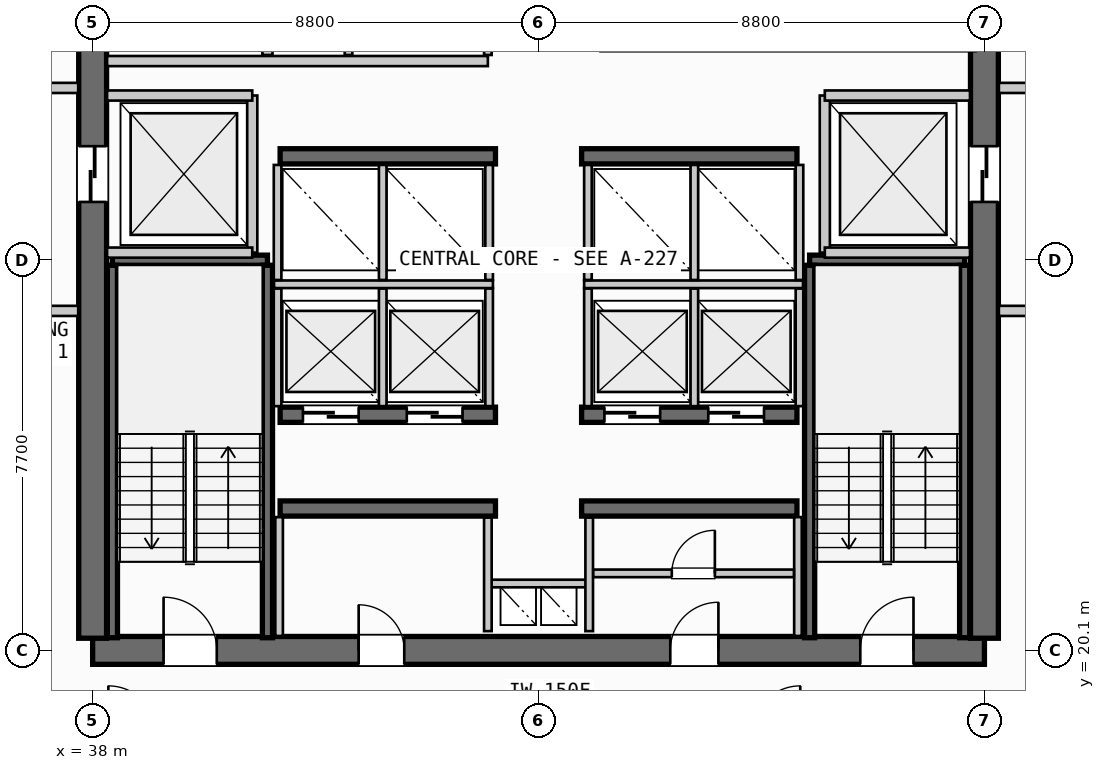
"""IFC4 building model, lengths in metres.
Left out: names, types, materials, properties, quantities, classifications, styles, units other than length and angle.
Written with IfcOpenShell. Run it as: python <this file> out.ifc"""

import sys

from ifc_helpers import new_model, si_unit, direction, frame, frame_2d, origin, place, context, subcontext, project, spatial, rectangle, extrude, source, transform, mapped, element, fill, save


model = new_model("IFC4")
c1 = context("Model", 3, precision=1e-05, world=origin(), true_north=direction((0.0, 1.0)))
c2 = subcontext(c1, "Body", "Model", "MODEL_VIEW")
j1 = project(units=[si_unit("LENGTHUNIT", "METRE"), si_unit("PLANEANGLEUNIT", "RADIAN")], contexts=[c1])
p1 = place(None, origin())
s1 = spatial("IfcSite", under=j1, at=p1, CompositionType="ELEMENT")
p2 = place(p1, origin())
s2 = spatial("IfcBuilding", under=s1, at=p2, CompositionType="ELEMENT")
p3 = place(p2, frame((0.0, 0.0, 193.9)))
s3 = spatial("IfcBuildingStorey", under=s2, at=p3, CompositionType="ELEMENT", Elevation=193.9)
p4 = place(p3, frame((38.0, 20.1, 0.0), z_axis=(0.0, 0.0, 1.0), x_axis=(1.0, 0.0, 0.0)))
e1 = element("IfcWall", 1, at=p4, inside=s3, PredefinedType="SHEAR", context=c2, shape_type="SweptSolid", body=[
    extrude(rectangle(XDim=17.6, YDim=0.55, at=frame_2d((8.8, 0.0))), origin(), (0.0, 0.0, 1.0), 3.26),
])
p5 = place(p4, frame((1.4, 0.0, 0.0)))
e2 = element("IfcOpeningElement", 2, at=p5, cuts=e1, PredefinedType="OPENING", context=c2, shape_type="SweptSolid", body=[
    extrude(rectangle(XDim=1.05, YDim=2.15, at=frame_2d((0.525, 1.075))), frame((0.0, 0.285, 0.0), z_axis=(0.0, -1.0, 0.0), x_axis=(1.0, 0.0, 0.0)), (0.0, 0.0, 1.0), 0.57),
])
p6 = place(p4, frame((15.15, 0.0, 0.0)))
e3 = element("IfcOpeningElement", 3, at=p6, cuts=e1, PredefinedType="OPENING", context=c2, shape_type="SweptSolid", body=[
    extrude(rectangle(XDim=1.05, YDim=2.15, at=frame_2d((0.525, 1.075))), frame((0.0, 0.285, 0.0), z_axis=(0.0, -1.0, 0.0), x_axis=(1.0, 0.0, 0.0)), (0.0, 0.0, 1.0), 0.57),
])
p7 = place(p4, frame((5.25, 0.0, 0.0)))
e4 = element("IfcOpeningElement", 4, at=p7, cuts=e1, PredefinedType="OPENING", context=c2, shape_type="SweptSolid", body=[
    extrude(rectangle(XDim=0.9, YDim=2.15, at=frame_2d((0.45, 1.075))), frame((0.0, 0.285, 0.0), z_axis=(0.0, -1.0, 0.0), x_axis=(1.0, 0.0, 0.0)), (0.0, 0.0, 1.0), 0.57),
])
p8 = place(p4, frame((11.4, 0.0, 0.0)))
e5 = element("IfcOpeningElement", 5, at=p8, cuts=e1, PredefinedType="OPENING", context=c2, shape_type="SweptSolid", body=[
    extrude(rectangle(XDim=0.95, YDim=2.15, at=frame_2d((0.475, 1.075))), frame((0.0, 0.285, 0.0), z_axis=(0.0, -1.0, 0.0), x_axis=(1.0, 0.0, 0.0)), (0.0, 0.0, 1.0), 0.57),
])
p9 = place(p3, frame((38.0, 35.26, 0.0), z_axis=(0.0, 0.0, 1.0), x_axis=(0.0, -1.0, 0.0)))
e6 = element("IfcWall", 6, at=p9, inside=s3, PredefinedType="SHEAR", context=c2, shape_type="SweptSolid", body=[
    extrude(rectangle(XDim=14.92, YDim=0.55, at=frame_2d((7.46, 0.0))), origin(), (0.0, 0.0, 1.0), 3.26),
])
p10 = place(p9, frame((5.21, 0.0, 0.0)))
e7 = element("IfcOpeningElement", 7, at=p10, cuts=e6, PredefinedType="OPENING", context=c2, shape_type="SweptSolid", body=[
    extrude(rectangle(XDim=1.1, YDim=2.2, at=frame_2d((0.55, 1.1))), frame((0.0, 0.285, 0.0), z_axis=(0.0, -1.0, 0.0), x_axis=(1.0, 0.0, 0.0)), (0.0, 0.0, 1.0), 0.57),
])
p11 = place(p3, frame((55.6, 20.34, 0.0), z_axis=(0.0, 0.0, 1.0), x_axis=(0.0, 1.0, 0.0)))
e8 = element("IfcWall", 8, at=p11, inside=s3, PredefinedType="SHEAR", context=c2, shape_type="SweptSolid", body=[
    extrude(rectangle(XDim=14.92, YDim=0.55, at=frame_2d((7.46, 0.0))), origin(), (0.0, 0.0, 1.0), 3.26),
])
p12 = place(p11, frame((12.71, 0.0, 0.0)))
e9 = element("IfcOpeningElement", 9, at=p12, cuts=e8, PredefinedType="OPENING", context=c2, shape_type="SweptSolid", body=[
    extrude(rectangle(XDim=1.05, YDim=2.15, at=frame_2d((0.525, 1.075))), frame((0.0, 0.285, 0.0), z_axis=(0.0, -1.0, 0.0), x_axis=(1.0, 0.0, 0.0)), (0.0, 0.0, 1.0), 0.57),
])
p13 = place(p11, frame((8.61, 0.0, 0.0)))
e10 = element("IfcOpeningElement", 10, at=p13, cuts=e8, PredefinedType="OPENING", context=c2, shape_type="SweptSolid", body=[
    extrude(rectangle(XDim=1.1, YDim=2.2, at=frame_2d((0.55, 1.1))), frame((0.0, 0.285, 0.0), z_axis=(0.0, -1.0, 0.0), x_axis=(1.0, 0.0, 0.0)), (0.0, 0.0, 1.0), 0.57),
])
for number, where, z_axis, x_axis in (
    (11, (41.7, 22.9, 0.0), (0.0, 0.0, 1.0), (1.0, 0.0, 0.0)),
    (12, (47.65, 22.9, 0.0), (0.0, 0.0, 1.0), (1.0, 0.0, 0.0)),
):
    element("IfcWall", number, at=place(p3, frame(where, z_axis=z_axis, x_axis=x_axis)), inside=s3, PredefinedType="SHEAR", context=c2, shape_type="SweptSolid", body=[
        extrude(rectangle(XDim=4.25, YDim=0.3, at=frame_2d((2.125, 0.0))), origin(), (0.0, 0.0, 1.0), 3.26),
    ])
p14 = place(p3, frame((41.7, 24.75, 0.0), z_axis=(0.0, 0.0, 1.0), x_axis=(1.0, 0.0, 0.0)))
e13 = element("IfcWall", 13, at=p14, inside=s3, PredefinedType="SHEAR", context=c2, shape_type="SweptSolid", body=[
    extrude(rectangle(XDim=4.25, YDim=0.3, at=frame_2d((2.125, 0.0))), origin(), (0.0, 0.0, 1.0), 3.26),
])
p15 = place(p14, frame((0.45, 0.0, 0.0)))
e14 = element("IfcOpeningElement", 14, at=p15, cuts=e13, PredefinedType="OPENING", context=c2, shape_type="SweptSolid", body=[
    extrude(rectangle(XDim=1.1, YDim=2.2, at=frame_2d((0.55, 1.1))), frame((0.0, 0.16, 0.0), z_axis=(0.0, -1.0, 0.0), x_axis=(1.0, 0.0, 0.0)), (0.0, 0.0, 1.0), 0.32),
])
p16 = place(p14, frame((2.5, 0.0, 0.0)))
e15 = element("IfcOpeningElement", 15, at=p16, cuts=e13, PredefinedType="OPENING", context=c2, shape_type="SweptSolid", body=[
    extrude(rectangle(XDim=1.1, YDim=2.2, at=frame_2d((0.55, 1.1))), frame((0.0, 0.16, 0.0), z_axis=(0.0, -1.0, 0.0), x_axis=(1.0, 0.0, 0.0)), (0.0, 0.0, 1.0), 0.32),
])
p17 = place(p3, frame((47.65, 24.75, 0.0), z_axis=(0.0, 0.0, 1.0), x_axis=(1.0, 0.0, 0.0)))
e16 = element("IfcWall", 16, at=p17, inside=s3, PredefinedType="SHEAR", context=c2, shape_type="SweptSolid", body=[
    extrude(rectangle(XDim=4.25, YDim=0.3, at=frame_2d((2.125, 0.0))), origin(), (0.0, 0.0, 1.0), 3.26),
])
p18 = place(p17, frame((0.45, 0.0, 0.0)))
e17 = element("IfcOpeningElement", 17, at=p18, cuts=e16, PredefinedType="OPENING", context=c2, shape_type="SweptSolid", body=[
    extrude(rectangle(XDim=1.1, YDim=2.2, at=frame_2d((0.55, 1.1))), frame((0.0, 0.16, 0.0), z_axis=(0.0, -1.0, 0.0), x_axis=(1.0, 0.0, 0.0)), (0.0, 0.0, 1.0), 0.32),
])
p19 = place(p17, frame((2.5, 0.0, 0.0)))
e18 = element("IfcOpeningElement", 18, at=p19, cuts=e16, PredefinedType="OPENING", context=c2, shape_type="SweptSolid", body=[
    extrude(rectangle(XDim=1.1, YDim=2.2, at=frame_2d((0.55, 1.1))), frame((0.0, 0.16, 0.0), z_axis=(0.0, -1.0, 0.0), x_axis=(1.0, 0.0, 0.0)), (0.0, 0.0, 1.0), 0.32),
])
for number, where, z_axis, x_axis in (
    (19, (41.7, 29.85, 0.0), (0.0, 0.0, 1.0), (1.0, 0.0, 0.0)),
    (20, (47.65, 29.85, 0.0), (0.0, 0.0, 1.0), (1.0, 0.0, 0.0)),
):
    element("IfcWall", number, at=place(p3, frame(where, z_axis=z_axis, x_axis=x_axis)), inside=s3, PredefinedType="SHEAR", context=c2, shape_type="SweptSolid", body=[
        extrude(rectangle(XDim=4.25, YDim=0.3, at=frame_2d((2.125, 0.0))), origin(), (0.0, 0.0, 1.0), 3.26),
    ])
p20 = place(p3, frame((38.39, 27.8, 0.0), z_axis=(0.0, 0.0, 1.0), x_axis=(1.0, 0.0, 0.0)))
e21 = element("IfcWall", 21, at=p20, inside=s3, PredefinedType="SHEAR", context=c2, shape_type="SweptSolid", body=[
    extrude(rectangle(XDim=3.06, YDim=0.2, at=frame_2d((1.53, 0.0))), origin(), (0.0, 0.0, 1.0), 3.26),
])
for number, where, z_axis, x_axis in (
    (22, (41.45, 27.7, 0.0), (0.0, 0.0, 1.0), (0.0, -1.0, 0.0)),
    (23, (38.39, 20.35, 0.0), (0.0, 0.0, 1.0), (0.0, 1.0, 0.0)),
):
    element("IfcWall", number, at=place(p3, frame(where, z_axis=z_axis, x_axis=x_axis)), inside=s3, PredefinedType="SHEAR", context=c2, shape_type="SweptSolid", body=[
        extrude(rectangle(XDim=7.35, YDim=0.2, at=frame_2d((3.675, 0.0))), origin(), (0.0, 0.0, 1.0), 3.26),
    ])
p21 = place(p3, frame((52.15, 27.8, 0.0), z_axis=(0.0, 0.0, 1.0), x_axis=(1.0, 0.0, 0.0)))
e24 = element("IfcWall", 24, at=p21, inside=s3, PredefinedType="SHEAR", context=c2, shape_type="SweptSolid", body=[
    extrude(rectangle(XDim=3.06, YDim=0.2, at=frame_2d((1.53, 0.0))), origin(), (0.0, 0.0, 1.0), 3.26),
])
for number, where, z_axis, x_axis in (
    (25, (55.21, 27.7, 0.0), (0.0, 0.0, 1.0), (0.0, -1.0, 0.0)),
    (26, (52.15, 20.35, 0.0), (0.0, 0.0, 1.0), (0.0, 1.0, 0.0)),
):
    element("IfcWall", number, at=place(p3, frame(where, z_axis=z_axis, x_axis=x_axis)), inside=s3, PredefinedType="SHEAR", context=c2, shape_type="SweptSolid", body=[
        extrude(rectangle(XDim=7.35, YDim=0.2, at=frame_2d((3.675, 0.0))), origin(), (0.0, 0.0, 1.0), 3.26),
    ])
p22 = place(p3, frame((45.8, 21.42, 0.0), z_axis=(0.0, 0.0, 1.0), x_axis=(1.0, 0.0, 0.0)))
e27 = element("IfcWall", 27, at=p22, inside=s3, PredefinedType="PARTITIONING", context=c2, shape_type="SweptSolid", body=[
    extrude(rectangle(XDim=2.0, YDim=0.15, at=frame_2d((1.0, 0.0))), origin(), (0.0, 0.0, 1.0), 2.735),
])
for number, where, z_axis, x_axis in (
    (28, (45.8, 20.48, 0.0), (0.0, 0.0, 1.0), (0.0, 1.0, 0.0)),
    (29, (47.8, 20.48, 0.0), (0.0, 0.0, 1.0), (0.0, 1.0, 0.0)),
):
    element("IfcWall", number, at=place(p3, frame(where, z_axis=z_axis, x_axis=x_axis)), inside=s3, PredefinedType="PARTITIONING", context=c2, shape_type="SweptSolid", body=[
        extrude(rectangle(XDim=2.24, YDim=0.15, at=frame_2d((1.12, 0.0))), origin(), (0.0, 0.0, 1.0), 2.735),
    ])
p23 = place(p3, frame((41.15, 27.95, 0.0), z_axis=(0.0, 0.0, 1.0), x_axis=(0.0, 1.0, 0.0)))
e30 = element("IfcWall", 30, at=p23, inside=s3, PredefinedType="PARTITIONING", context=c2, shape_type="SweptSolid", body=[
    extrude(rectangle(XDim=3.1, YDim=0.2, at=frame_2d((1.55, 0.0))), origin(), (0.0, 0.0, 1.0), 2.735),
])
for number, where, z_axis, x_axis in (
    (31, (38.285, 27.95, 0.0), (0.0, 0.0, 1.0), (1.0, 0.0, 0.0)),
    (32, (38.285, 31.05, 0.0), (0.0, 0.0, 1.0), (1.0, 0.0, 0.0)),
):
    element("IfcWall", number, at=place(p3, frame(where, z_axis=z_axis, x_axis=x_axis)), inside=s3, PredefinedType="PARTITIONING", context=c2, shape_type="SweptSolid", body=[
        extrude(rectangle(XDim=2.865, YDim=0.2, at=frame_2d((1.433, 0.0))), origin(), (0.0, 0.0, 1.0), 2.735),
    ])
for number, where, z_axis, x_axis in (
    (33, (34.5, 26.8, 0.0), (0.0, 0.0, 1.0), (1.0, 0.0, 0.0)),
    (34, (34.5, 31.2, 0.0), (0.0, 0.0, 1.0), (1.0, 0.0, 0.0)),
):
    element("IfcWall", number, at=place(p3, frame(where, z_axis=z_axis, x_axis=x_axis)), inside=s3, PredefinedType="PARTITIONING", context=c2, shape_type="SweptSolid", body=[
        extrude(rectangle(XDim=3.215, YDim=0.2, at=frame_2d((1.607, 0.0))), origin(), (0.0, 0.0, 1.0), 2.735),
    ])
p24 = place(p3, frame((52.45, 27.95, 0.0), z_axis=(0.0, 0.0, 1.0), x_axis=(0.0, 1.0, 0.0)))
e35 = element("IfcWall", 35, at=p24, inside=s3, PredefinedType="PARTITIONING", context=c2, shape_type="SweptSolid", body=[
    extrude(rectangle(XDim=3.1, YDim=0.2, at=frame_2d((1.55, 0.0))), origin(), (0.0, 0.0, 1.0), 2.735),
])
for number, where, z_axis, x_axis in (
    (36, (52.45, 27.95, 0.0), (0.0, 0.0, 1.0), (1.0, 0.0, 0.0)),
    (37, (52.45, 31.05, 0.0), (0.0, 0.0, 1.0), (1.0, 0.0, 0.0)),
):
    element("IfcWall", number, at=place(p3, frame(where, z_axis=z_axis, x_axis=x_axis)), inside=s3, PredefinedType="PARTITIONING", context=c2, shape_type="SweptSolid", body=[
        extrude(rectangle(XDim=2.865, YDim=0.2, at=frame_2d((1.433, 0.0))), origin(), (0.0, 0.0, 1.0), 2.735),
    ])
for number, where, z_axis, x_axis in (
    (38, (55.885, 26.8, 0.0), (0.0, 0.0, 1.0), (1.0, 0.0, 0.0)),
    (39, (55.885, 31.2, 0.0), (0.0, 0.0, 1.0), (1.0, 0.0, 0.0)),
):
    element("IfcWall", number, at=place(p3, frame(where, z_axis=z_axis, x_axis=x_axis)), inside=s3, PredefinedType="PARTITIONING", context=c2, shape_type="SweptSolid", body=[
        extrude(rectangle(XDim=3.215, YDim=0.2, at=frame_2d((1.607, 0.0))), origin(), (0.0, 0.0, 1.0), 2.735),
    ])
for number, where, z_axis, x_axis in (
    (40, (41.68, 20.385, 0.0), (0.0, 0.0, 1.0), (0.0, 1.0, 0.0)),
    (41, (51.92, 20.385, 0.0), (0.0, 0.0, 1.0), (0.0, 1.0, 0.0)),
):
    element("IfcWall", number, at=place(p3, frame(where, z_axis=z_axis, x_axis=x_axis)), inside=s3, PredefinedType="PARTITIONING", context=c2, shape_type="SweptSolid", body=[
        extrude(rectangle(XDim=2.345, YDim=0.15, at=frame_2d((1.172, 0.0))), origin(), (0.0, 0.0, 1.0), 2.735),
    ])
p25 = place(p3, frame((47.88, 21.62, 0.0), z_axis=(0.0, 0.0, 1.0), x_axis=(1.0, 0.0, 0.0)))
e42 = element("IfcWall", 42, at=p25, inside=s3, PredefinedType="PARTITIONING", context=c2, shape_type="SweptSolid", body=[
    extrude(rectangle(XDim=3.96, YDim=0.15, at=frame_2d((1.98, 0.0))), origin(), (0.0, 0.0, 1.0), 2.735),
])
p26 = place(p25, frame((1.55, 0.0, 0.0)))
e43 = element("IfcOpeningElement", 43, at=p26, cuts=e42, PredefinedType="OPENING", context=c2, shape_type="SweptSolid", body=[
    extrude(rectangle(XDim=0.85, YDim=2.15, at=frame_2d((0.425, 1.075))), frame((0.0, 0.085, 0.0), z_axis=(0.0, -1.0, 0.0), x_axis=(1.0, 0.0, 0.0)), (0.0, 0.0, 1.0), 0.17),
])
p27 = place(p3, frame((41.58, 27.325, 0.0), z_axis=(0.0, 0.0, 1.0), x_axis=(1.0, 0.0, 0.0)))
e44 = element("IfcWall", 44, at=p27, inside=s3, PredefinedType="PARTITIONING", context=c2, shape_type="SweptSolid", body=[
    extrude(rectangle(XDim=4.32, YDim=0.15, at=frame_2d((2.16, 0.0))), origin(), (0.0, 0.0, 1.0), 2.735),
])
p28 = place(p3, frame((47.7, 27.325, 0.0), z_axis=(0.0, 0.0, 1.0), x_axis=(1.0, 0.0, 0.0)))
e45 = element("IfcWall", 45, at=p28, inside=s3, PredefinedType="PARTITIONING", context=c2, shape_type="SweptSolid", body=[
    extrude(rectangle(XDim=4.32, YDim=0.15, at=frame_2d((2.16, 0.0))), origin(), (0.0, 0.0, 1.0), 2.735),
])
for number, where, z_axis, x_axis in (
    (46, (41.65, 24.92, 0.0), (0.0, 0.0, 1.0), (0.0, 1.0, 0.0)),
    (47, (43.725, 24.92, 0.0), (0.0, 0.0, 1.0), (0.0, 1.0, 0.0)),
    (48, (45.825, 24.92, 0.0), (0.0, 0.0, 1.0), (0.0, 1.0, 0.0)),
    (49, (47.775, 24.92, 0.0), (0.0, 0.0, 1.0), (0.0, 1.0, 0.0)),
    (50, (49.875, 24.92, 0.0), (0.0, 0.0, 1.0), (0.0, 1.0, 0.0)),
    (51, (51.95, 24.92, 0.0), (0.0, 0.0, 1.0), (0.0, 1.0, 0.0)),
):
    element("IfcWall", number, at=place(p3, frame(where, z_axis=z_axis, x_axis=x_axis)), inside=s3, PredefinedType="PARTITIONING", context=c2, shape_type="SweptSolid", body=[
        extrude(rectangle(XDim=2.32, YDim=0.15, at=frame_2d((1.16, 0.0))), origin(), (0.0, 0.0, 1.0), 2.735),
    ])
for number, where, z_axis, x_axis in (
    (52, (41.65, 27.41, 0.0), (0.0, 0.0, 1.0), (0.0, 1.0, 0.0)),
    (53, (43.725, 27.41, 0.0), (0.0, 0.0, 1.0), (0.0, 1.0, 0.0)),
    (54, (45.825, 27.41, 0.0), (0.0, 0.0, 1.0), (0.0, 1.0, 0.0)),
    (55, (47.775, 27.41, 0.0), (0.0, 0.0, 1.0), (0.0, 1.0, 0.0)),
    (56, (49.875, 27.41, 0.0), (0.0, 0.0, 1.0), (0.0, 1.0, 0.0)),
    (57, (51.95, 27.41, 0.0), (0.0, 0.0, 1.0), (0.0, 1.0, 0.0)),
):
    element("IfcWall", number, at=place(p3, frame(where, z_axis=z_axis, x_axis=x_axis)), inside=s3, PredefinedType="PARTITIONING", context=c2, shape_type="SweptSolid", body=[
        extrude(rectangle(XDim=2.27, YDim=0.15, at=frame_2d((1.135, 0.0))), origin(), (0.0, 0.0, 1.0), 2.735),
    ])
p29 = place(p3, frame((41.45, 31.85, 0.0), z_axis=(0.0, 0.0, 1.0), x_axis=(0.0, 1.0, 0.0)))
e58 = element("IfcWall", 58, at=p29, inside=s3, PredefinedType="PARTITIONING", context=c2, shape_type="SweptSolid", body=[
    extrude(rectangle(XDim=3.365, YDim=0.2, at=frame_2d((1.683, 0.0))), origin(), (0.0, 0.0, 1.0), 2.735),
])
p30 = place(p3, frame((38.285, 31.73, 0.0), z_axis=(0.0, 0.0, 1.0), x_axis=(1.0, 0.0, 0.0)))
e59 = element("IfcWall", 59, at=p30, inside=s3, PredefinedType="PARTITIONING", context=c2, shape_type="SweptSolid", body=[
    extrude(rectangle(XDim=7.515, YDim=0.2, at=frame_2d((3.758, 0.0))), origin(), (0.0, 0.0, 1.0), 2.735),
])
p31 = place(p3, frame((45.8, 31.85, 0.0), z_axis=(0.0, 0.0, 1.0), x_axis=(0.0, 1.0, 0.0)))
e60 = element("IfcWall", 60, at=p31, inside=s3, PredefinedType="PARTITIONING", context=c2, shape_type="SweptSolid", body=[
    extrude(rectangle(XDim=3.365, YDim=0.15, at=frame_2d((1.683, 0.0))), origin(), (0.0, 0.0, 1.0), 2.735),
])
p32 = place(p3, frame((43.05, 31.85, 0.0), z_axis=(0.0, 0.0, 1.0), x_axis=(0.0, 1.0, 0.0)))
e61 = element("IfcWall", 61, at=p32, inside=s3, PredefinedType="PLUMBINGWALL", context=c2, shape_type="SweptSolid", body=[
    extrude(rectangle(XDim=3.365, YDim=0.15, at=frame_2d((1.683, 0.0))), origin(), (0.0, 0.0, 1.0), 2.735),
])
m1 = source(origin(), c2, "Body", "SweptSolid", [
    extrude(rectangle(XDim=1.05, YDim=2.15, at=frame_2d((0.525, 1.075))), frame((0.0, 0.025, 0.0), z_axis=(0.0, -1.0, 0.0), x_axis=(1.0, 0.0, 0.0)), (0.0, 0.0, 1.0), 0.05),
])
p33 = place(p5, origin())
e62 = element("IfcDoor", 62, at=p33, inside=s3, OperationType="SINGLE_SWING_LEFT", PredefinedType="DOOR", context=c2, shape_type="MappedRepresentation", body=[
    mapped(m1, transform((0.0, 0.0, 0.0), scale=1.0)),
])
fill(e2, e62)
p34 = place(p6, origin())
e63 = element("IfcDoor", 63, at=p34, inside=s3, OperationType="SINGLE_SWING_RIGHT", PredefinedType="DOOR", context=c2, shape_type="MappedRepresentation", body=[
    mapped(m1, transform((0.0, 0.0, 0.0), scale=1.0)),
])
fill(e3, e63)
m2 = source(origin(), c2, "Body", "SweptSolid", [
    extrude(rectangle(XDim=1.1, YDim=2.2, at=frame_2d((0.55, 1.1))), frame((0.0, 0.025, 0.0), z_axis=(0.0, -1.0, 0.0), x_axis=(1.0, 0.0, 0.0)), (0.0, 0.0, 1.0), 0.05),
])
p35 = place(p10, origin())
e64 = element("IfcDoor", 64, at=p35, inside=s3, OperationType="SLIDING_TO_LEFT", PredefinedType="DOOR", context=c2, shape_type="MappedRepresentation", body=[
    mapped(m2, transform((0.0, 0.0, 0.0), scale=1.0)),
])
fill(e7, e64)
p36 = place(p13, origin())
e65 = element("IfcDoor", 65, at=p36, inside=s3, OperationType="SLIDING_TO_RIGHT", PredefinedType="DOOR", context=c2, shape_type="MappedRepresentation", body=[
    mapped(m2, transform((0.0, 0.0, 0.0), scale=1.0)),
])
fill(e10, e65)
m3 = source(origin(), c2, "Body", "SweptSolid", [
    extrude(rectangle(XDim=0.9, YDim=2.15, at=frame_2d((0.45, 1.075))), frame((0.0, 0.025, 0.0), z_axis=(0.0, -1.0, 0.0), x_axis=(1.0, 0.0, 0.0)), (0.0, 0.0, 1.0), 0.05),
])
p37 = place(p7, origin())
e66 = element("IfcDoor", 66, at=p37, inside=s3, OperationType="SINGLE_SWING_LEFT", PredefinedType="DOOR", context=c2, shape_type="MappedRepresentation", body=[
    mapped(m3, transform((0.0, 0.0, 0.0), scale=1.0)),
])
fill(e4, e66)
m4 = source(origin(), c2, "Body", "SweptSolid", [
    extrude(rectangle(XDim=0.95, YDim=2.15, at=frame_2d((0.475, 1.075))), frame((0.0, 0.025, 0.0), z_axis=(0.0, -1.0, 0.0), x_axis=(1.0, 0.0, 0.0)), (0.0, 0.0, 1.0), 0.05),
])
p38 = place(p8, origin())
e67 = element("IfcDoor", 67, at=p38, inside=s3, OperationType="SINGLE_SWING_RIGHT", PredefinedType="DOOR", context=c2, shape_type="MappedRepresentation", body=[
    mapped(m4, transform((0.0, 0.0, 0.0), scale=1.0)),
])
fill(e5, e67)
p39 = place(p15, origin())
e68 = element("IfcDoor", 68, at=p39, inside=s3, OperationType="SLIDING_TO_RIGHT", PredefinedType="DOOR", context=c2, shape_type="MappedRepresentation", body=[
    mapped(m2, transform((0.0, 0.0, 0.0), scale=1.0)),
])
fill(e14, e68)
p40 = place(p16, origin())
e69 = element("IfcDoor", 69, at=p40, inside=s3, OperationType="SLIDING_TO_RIGHT", PredefinedType="DOOR", context=c2, shape_type="MappedRepresentation", body=[
    mapped(m2, transform((0.0, 0.0, 0.0), scale=1.0)),
])
fill(e15, e69)
p41 = place(p18, origin())
e70 = element("IfcDoor", 70, at=p41, inside=s3, OperationType="SLIDING_TO_RIGHT", PredefinedType="DOOR", context=c2, shape_type="MappedRepresentation", body=[
    mapped(m2, transform((0.0, 0.0, 0.0), scale=1.0)),
])
fill(e17, e70)
p42 = place(p19, origin())
e71 = element("IfcDoor", 71, at=p42, inside=s3, OperationType="SLIDING_TO_RIGHT", PredefinedType="DOOR", context=c2, shape_type="MappedRepresentation", body=[
    mapped(m2, transform((0.0, 0.0, 0.0), scale=1.0)),
])
fill(e18, e71)
m5 = source(origin(), c2, "Body", "SweptSolid", [
    extrude(rectangle(XDim=0.85, YDim=2.15, at=frame_2d((0.425, 1.075))), frame((0.0, 0.025, 0.0), z_axis=(0.0, -1.0, 0.0), x_axis=(1.0, 0.0, 0.0)), (0.0, 0.0, 1.0), 0.05),
])
p43 = place(p26, origin())
e72 = element("IfcDoor", 72, at=p43, inside=s3, OperationType="SINGLE_SWING_RIGHT", PredefinedType="DOOR", context=c2, shape_type="MappedRepresentation", body=[
    mapped(m5, transform((0.0, 0.0, 0.0), scale=1.0)),
])
fill(e43, e72)
save(model, sys.argv[1])
